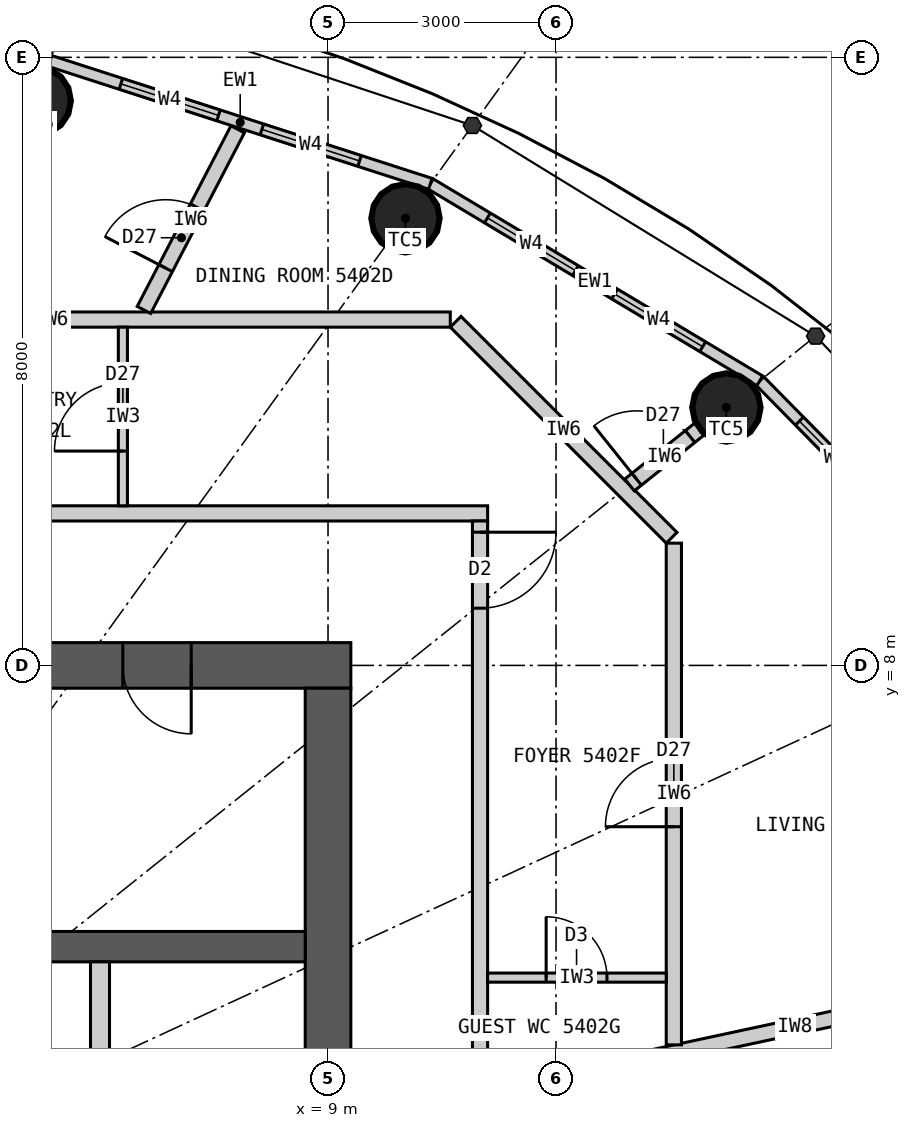
"""IFC4 building model, lengths in metres.
Left out: names, types, materials, properties, quantities, classifications, styles, units other than length and angle.
Written with IfcOpenShell. Run it as: python <this file> out.ifc"""

import sys

from ifc_helpers import new_model, si_unit, direction, frame, frame_2d, origin, origin_2d, place, context, subcontext, project, spatial, rectangle, circle, extrude, element, fill, save


model = new_model("IFC4")
c1 = context("Model", 3, precision=1e-05, world=origin(), true_north=direction((0.0, 1.0)))
c2 = subcontext(c1, "Body", "Model", "MODEL_VIEW")
j1 = project(units=[si_unit("LENGTHUNIT", "METRE"), si_unit("PLANEANGLEUNIT", "RADIAN")], contexts=[c1])
p1 = place(None, origin())
s1 = spatial("IfcSite", under=j1, at=p1, CompositionType="ELEMENT")
p2 = place(p1, origin())
s2 = spatial("IfcBuilding", under=s1, at=p2, CompositionType="ELEMENT")
p3 = place(p2, frame((0.0, 0.0, 202.8)))
s3 = spatial("IfcBuildingStorey", under=s2, at=p3, CompositionType="ELEMENT", Elevation=202.8)
for number, where, z_axis, x_axis in (
    (1, (14.241, 11.393, 0.0), (0.0, 0.0, 1.0), (1.0, 0.0, 0.0)),
    (2, (10.019, 13.883, 0.0), (0.0, 0.0, 1.0), (1.0, 0.0, 0.0)),
    (3, (5.167, 15.427, 0.0), (0.0, 0.0, 1.0), (1.0, 0.0, 0.0)),
):
    element("IfcColumn", number, at=place(p3, frame(where, z_axis=z_axis, x_axis=x_axis)), inside=s3, PredefinedType="COLUMN", context=c2, shape_type="SweptSolid", body=[
        extrude(circle(Radius=0.45, at=origin_2d()), origin(), (0.0, 0.0, 1.0), 3.3),
    ])
p4 = place(p3, frame((-9.3, 8.0, 0.0), z_axis=(0.0, 0.0, 1.0), x_axis=(1.0, 0.0, 0.0)))
e4 = element("IfcWall", 4, at=p4, inside=s3, PredefinedType="SHEAR", context=c2, shape_type="SweptSolid", body=[
    extrude(rectangle(XDim=18.6, YDim=0.6, at=frame_2d((9.3, 0.0))), origin(), (0.0, 0.0, 1.0), 3.3),
])
p5 = place(p4, frame((8.0, 0.0, 0.0)))
e5 = element("IfcOpeningElement", 5, at=p5, cuts=e4, PredefinedType="OPENING", context=c2, shape_type="SweptSolid", body=[
    extrude(rectangle(XDim=1.2, YDim=2.2, at=frame_2d((0.6, 1.1))), frame((0.0, 0.31, 0.0), z_axis=(0.0, -1.0, 0.0), x_axis=(1.0, 0.0, 0.0)), (0.0, 0.0, 1.0), 0.62),
])
p6 = place(p4, frame((15.6, 0.0, 0.0)))
e6 = element("IfcOpeningElement", 6, at=p6, cuts=e4, PredefinedType="OPENING", context=c2, shape_type="SweptSolid", body=[
    extrude(rectangle(XDim=0.9, YDim=2.2, at=frame_2d((0.45, 1.1))), frame((0.0, 0.31, 0.0), z_axis=(0.0, -1.0, 0.0), x_axis=(1.0, 0.0, 0.0)), (0.0, 0.0, 1.0), 0.62),
])
p7 = place(p3, frame((9.0, -7.7, 0.0), z_axis=(0.0, 0.0, 1.0), x_axis=(0.0, 1.0, 0.0)))
e7 = element("IfcWall", 7, at=p7, inside=s3, PredefinedType="SHEAR", context=c2, shape_type="SweptSolid", body=[
    extrude(rectangle(XDim=15.4, YDim=0.6, at=frame_2d((7.7, 0.0))), origin(), (0.0, 0.0, 1.0), 3.3),
])
p8 = place(p7, frame((6.8, 0.0, 0.0)))
e8 = element("IfcOpeningElement", 8, at=p8, cuts=e7, PredefinedType="OPENING", context=c2, shape_type="SweptSolid", body=[
    extrude(rectangle(XDim=1.8, YDim=2.2, at=frame_2d((0.9, 1.1))), frame((0.0, 0.31, 0.0), z_axis=(0.0, -1.0, 0.0), x_axis=(1.0, 0.0, 0.0)), (0.0, 0.0, 1.0), 0.62),
])
p9 = place(p3, frame((-8.7, 4.3, 0.0), z_axis=(0.0, 0.0, 1.0), x_axis=(1.0, 0.0, 0.0)))
e9 = element("IfcWall", 9, at=p9, inside=s3, PredefinedType="SHEAR", context=c2, shape_type="SweptSolid", body=[
    extrude(rectangle(XDim=17.4, YDim=0.4, at=frame_2d((8.7, 0.0))), origin(), (0.0, 0.0, 1.0), 3.3),
])
p10 = place(p3, frame((6.0, 1.75, 0.0), z_axis=(0.0, 0.0, 1.0), x_axis=(0.0, 1.0, 0.0)))
e10 = element("IfcWall", 10, at=p10, inside=s3, PredefinedType="PARTITIONING", context=c2, shape_type="SweptSolid", body=[
    extrude(rectangle(XDim=2.35, YDim=0.25, at=frame_2d((1.175, 0.0))), origin(), (0.0, 0.0, 1.0), 3.3),
])
p11 = place(p3, frame((18.04, 8.332, 0.0), z_axis=(0.0, 0.0, 1.0), x_axis=(-0.701527379618, 0.712642501993, 0.0)))
e11 = element("IfcWall", 11, at=p11, inside=s3, PredefinedType="ELEMENTEDWALL", context=c2, shape_type="SweptSolid", body=[
    extrude(rectangle(XDim=4.788, YDim=0.15, at=frame_2d((2.394, 0.0))), origin(), (0.0, 0.0, 1.0), 3.12),
])
p12 = place(p11, frame((0.744, 0.0, 0.9)))
e12 = element("IfcOpeningElement", 12, at=p12, cuts=e11, PredefinedType="OPENING", context=c2, shape_type="SweptSolid", body=[
    extrude(rectangle(XDim=1.35, YDim=1.9, at=frame_2d((0.675, 0.95))), frame((0.0, 0.085, 0.0), z_axis=(0.0, -1.0, 0.0), x_axis=(1.0, 0.0, 0.0)), (0.0, 0.0, 1.0), 0.17),
])
p13 = place(p11, frame((2.694, 0.0, 0.9)))
e13 = element("IfcOpeningElement", 13, at=p13, cuts=e11, PredefinedType="OPENING", context=c2, shape_type="SweptSolid", body=[
    extrude(rectangle(XDim=1.35, YDim=1.9, at=frame_2d((0.675, 0.95))), frame((0.0, 0.085, 0.0), z_axis=(0.0, -1.0, 0.0), x_axis=(1.0, 0.0, 0.0)), (0.0, 0.0, 1.0), 0.17),
])
p14 = place(p3, frame((14.68, 11.744, 0.0), z_axis=(0.0, 0.0, 1.0), x_axis=(-0.85822150553, 0.513279502265, 0.0)))
e14 = element("IfcWall", 14, at=p14, inside=s3, PredefinedType="ELEMENTEDWALL", context=c2, shape_type="SweptSolid", body=[
    extrude(rectangle(XDim=5.05, YDim=0.15, at=frame_2d((2.525, 0.0))), origin(), (0.0, 0.0, 1.0), 3.12),
])
p15 = place(p14, frame((0.875, 0.0, 0.9)))
e15 = element("IfcOpeningElement", 15, at=p15, cuts=e14, PredefinedType="OPENING", context=c2, shape_type="SweptSolid", body=[
    extrude(rectangle(XDim=1.35, YDim=1.9, at=frame_2d((0.675, 0.95))), frame((0.0, 0.085, 0.0), z_axis=(0.0, -1.0, 0.0), x_axis=(1.0, 0.0, 0.0)), (0.0, 0.0, 1.0), 0.17),
])
p16 = place(p14, frame((2.825, 0.0, 0.9)))
e16 = element("IfcOpeningElement", 16, at=p16, cuts=e14, PredefinedType="OPENING", context=c2, shape_type="SweptSolid", body=[
    extrude(rectangle(XDim=1.35, YDim=1.9, at=frame_2d((0.675, 0.95))), frame((0.0, 0.085, 0.0), z_axis=(0.0, -1.0, 0.0), x_axis=(1.0, 0.0, 0.0)), (0.0, 0.0, 1.0), 0.17),
])
p17 = place(p3, frame((10.346, 14.336, 0.0), z_axis=(0.0, 0.0, 1.0), x_axis=(-0.951644702515, 0.307200846638, 0.0)))
e17 = element("IfcWall", 17, at=p17, inside=s3, PredefinedType="ELEMENTEDWALL", context=c2, shape_type="SweptSolid", body=[
    extrude(rectangle(XDim=5.258, YDim=0.15, at=frame_2d((2.629, 0.0))), origin(), (0.0, 0.0, 1.0), 3.12),
])
p18 = place(p17, frame((0.979, 0.0, 0.9)))
e18 = element("IfcOpeningElement", 18, at=p18, cuts=e17, PredefinedType="OPENING", context=c2, shape_type="SweptSolid", body=[
    extrude(rectangle(XDim=1.35, YDim=1.9, at=frame_2d((0.675, 0.95))), frame((0.0, 0.085, 0.0), z_axis=(0.0, -1.0, 0.0), x_axis=(1.0, 0.0, 0.0)), (0.0, 0.0, 1.0), 0.17),
])
p19 = place(p17, frame((2.929, 0.0, 0.9)))
e19 = element("IfcOpeningElement", 19, at=p19, cuts=e17, PredefinedType="OPENING", context=c2, shape_type="SweptSolid", body=[
    extrude(rectangle(XDim=1.35, YDim=1.9, at=frame_2d((0.675, 0.95))), frame((0.0, 0.085, 0.0), z_axis=(0.0, -1.0, 0.0), x_axis=(1.0, 0.0, 0.0)), (0.0, 0.0, 1.0), 0.17),
])
p20 = place(p3, frame((-11.1, 10.0, 0.0), z_axis=(0.0, 0.0, 1.0), x_axis=(1.0, 0.0, 0.0)))
e20 = element("IfcWall", 20, at=p20, inside=s3, PredefinedType="PARTITIONING", context=c2, shape_type="SweptSolid", body=[
    extrude(rectangle(XDim=22.2, YDim=0.2, at=frame_2d((11.1, 0.0))), origin(), (0.0, 0.0, 1.0), 3.12),
])
p21 = place(p20, frame((2.309, 0.0, 0.0)))
e21 = element("IfcOpeningElement", 21, at=p21, cuts=e20, PredefinedType="OPENING", context=c2, shape_type="SweptSolid", body=[
    extrude(rectangle(XDim=1.0, YDim=2.2, at=frame_2d((0.5, 1.1))), frame((0.0, 0.11, 0.0), z_axis=(0.0, -1.0, 0.0), x_axis=(1.0, 0.0, 0.0)), (0.0, 0.0, 1.0), 0.22),
])
p22 = place(p3, frame((11.0, -9.9, 0.0), z_axis=(0.0, 0.0, 1.0), x_axis=(0.0, 1.0, 0.0)))
e22 = element("IfcWall", 22, at=p22, inside=s3, PredefinedType="PARTITIONING", context=c2, shape_type="SweptSolid", body=[
    extrude(rectangle(XDim=19.8, YDim=0.2, at=frame_2d((9.9, 0.0))), origin(), (0.0, 0.0, 1.0), 3.12),
])
p23 = place(p22, frame((10.32, 0.0, 0.0)))
e23 = element("IfcOpeningElement", 23, at=p23, cuts=e22, PredefinedType="OPENING", context=c2, shape_type="SweptSolid", body=[
    extrude(rectangle(XDim=1.0, YDim=2.2, at=frame_2d((0.5, 1.1))), frame((0.0, 0.11, 0.0), z_axis=(0.0, -1.0, 0.0), x_axis=(1.0, 0.0, 0.0)), (0.0, 0.0, 1.0), 0.22),
])
p24 = place(p22, frame((18.653, 0.0, 0.0)))
e24 = element("IfcOpeningElement", 24, at=p24, cuts=e22, PredefinedType="OPENING", context=c2, shape_type="SweptSolid", body=[
    extrude(rectangle(XDim=1.0, YDim=2.2, at=frame_2d((0.5, 1.1))), frame((0.0, 0.11, 0.0), z_axis=(0.0, -1.0, 0.0), x_axis=(1.0, 0.0, 0.0)), (0.0, 0.0, 1.0), 0.22),
])
p25 = place(p22, frame((0.379, 0.0, 0.0)))
e25 = element("IfcOpeningElement", 25, at=p25, cuts=e22, PredefinedType="OPENING", context=c2, shape_type="SweptSolid", body=[
    extrude(rectangle(XDim=1.0, YDim=2.2, at=frame_2d((0.5, 1.1))), frame((0.0, 0.11, 0.0), z_axis=(0.0, -1.0, 0.0), x_axis=(1.0, 0.0, 0.0)), (0.0, 0.0, 1.0), 0.22),
])
p26 = place(p3, frame((11.1, 2.379, 0.0), z_axis=(0.0, 0.0, 1.0), x_axis=(0.977789888126, 0.209587534647, 0.0)))
e26 = element("IfcWall", 26, at=p26, inside=s3, PredefinedType="PARTITIONING", context=c2, shape_type="SweptSolid", body=[
    extrude(rectangle(XDim=8.273, YDim=0.2, at=frame_2d((4.136, 0.0))), origin(), (0.0, 0.0, 1.0), 2.42),
])
p27 = place(p3, frame((13.55, 3.008, 0.0), z_axis=(0.0, 0.0, 1.0), x_axis=(0.0, 1.0, 0.0)))
e27 = element("IfcWall", 27, at=p27, inside=s3, PredefinedType="PARTITIONING", context=c2, shape_type="SweptSolid", body=[
    extrude(rectangle(XDim=6.601, YDim=0.2, at=frame_2d((3.3, 0.0))), origin(), (0.0, 0.0, 1.0), 3.12),
])
p28 = place(p27, frame((2.87, 0.0, 0.0)))
e28 = element("IfcOpeningElement", 28, at=p28, cuts=e27, PredefinedType="OPENING", context=c2, shape_type="SweptSolid", body=[
    extrude(rectangle(XDim=0.9, YDim=2.1, at=frame_2d((0.45, 1.05))), frame((0.0, 0.11, 0.0), z_axis=(0.0, -1.0, 0.0), x_axis=(1.0, 0.0, 0.0)), (0.0, 0.0, 1.0), 0.22),
])
p29 = place(p3, frame((13.521, 9.679, 0.0), z_axis=(0.0, 0.0, 1.0), x_axis=(-0.707106781187, 0.707106781187, 0.0)))
e29 = element("IfcWall", 29, at=p29, inside=s3, PredefinedType="PARTITIONING", context=c2, shape_type="SweptSolid", body=[
    extrude(rectangle(XDim=4.019, YDim=0.2, at=frame_2d((2.009, 0.0))), origin(), (0.0, 0.0, 1.0), 3.12),
])
p30 = place(p3, frame((10.609, 12.55, 0.0), z_axis=(0.0, 0.0, 1.0), x_axis=(-1.0, 0.0, 0.0)))
e30 = element("IfcWall", 30, at=p30, inside=s3, PredefinedType="PARTITIONING", context=c2, shape_type="SweptSolid", body=[
    extrude(rectangle(XDim=10.508, YDim=0.2, at=frame_2d((5.254, 0.0))), origin(), (0.0, 0.0, 1.0), 3.12),
])
p31 = place(p30, frame((6.588, 0.0, 0.0)))
e31 = element("IfcOpeningElement", 31, at=p31, cuts=e30, PredefinedType="OPENING", context=c2, shape_type="SweptSolid", body=[
    extrude(rectangle(XDim=0.9, YDim=2.1, at=frame_2d((0.45, 1.05))), frame((0.0, 0.11, 0.0), z_axis=(0.0, -1.0, 0.0), x_axis=(1.0, 0.0, 0.0)), (0.0, 0.0, 1.0), 0.22),
])
p32 = place(p30, frame((8.308, 0.0, 0.0)))
e32 = element("IfcOpeningElement", 32, at=p32, cuts=e30, PredefinedType="OPENING", context=c2, shape_type="SweptSolid", body=[
    extrude(rectangle(XDim=0.8, YDim=2.1, at=frame_2d((0.4, 1.05))), frame((0.0, 0.11, 0.0), z_axis=(0.0, -1.0, 0.0), x_axis=(1.0, 0.0, 0.0)), (0.0, 0.0, 1.0), 0.22),
])
p33 = place(p3, frame((12.968, 10.374, 0.0), z_axis=(0.0, 0.0, 1.0), x_axis=(0.780888968944, 0.624669847345, 0.0)))
e33 = element("IfcWall", 33, at=p33, inside=s3, PredefinedType="PARTITIONING", context=c2, shape_type="SweptSolid", body=[
    extrude(rectangle(XDim=1.181, YDim=0.2, at=frame_2d((0.591, 0.0))), origin(), (0.0, 0.0, 1.0), 2.42),
])
p34 = place(p33, frame((0.12, 0.0, 0.0)))
e34 = element("IfcOpeningElement", 34, at=p34, cuts=e33, PredefinedType="OPENING", context=c2, shape_type="SweptSolid", body=[
    extrude(rectangle(XDim=0.9, YDim=2.1, at=frame_2d((0.45, 1.05))), frame((0.0, 0.11, 0.0), z_axis=(0.0, -1.0, 0.0), x_axis=(1.0, 0.0, 0.0)), (0.0, 0.0, 1.0), 0.22),
])
p35 = place(p3, frame((6.578, 12.677, 0.0), z_axis=(0.0, 0.0, 1.0), x_axis=(0.460620531465, 0.887597164255, 0.0)))
e35 = element("IfcWall", 35, at=p35, inside=s3, PredefinedType="PARTITIONING", context=c2, shape_type="SweptSolid", body=[
    extrude(rectangle(XDim=2.678, YDim=0.2, at=frame_2d((1.339, 0.0))), origin(), (0.0, 0.0, 1.0), 3.12),
])
p36 = place(p35, frame((0.62, 0.0, 0.0)))
e36 = element("IfcOpeningElement", 36, at=p36, cuts=e35, PredefinedType="OPENING", context=c2, shape_type="SweptSolid", body=[
    extrude(rectangle(XDim=0.9, YDim=2.1, at=frame_2d((0.45, 1.05))), frame((0.0, 0.11, 0.0), z_axis=(0.0, -1.0, 0.0), x_axis=(1.0, 0.0, 0.0)), (0.0, 0.0, 1.0), 0.22),
])
p37 = place(p3, frame((11.1, 3.893, 0.0), z_axis=(0.0, 0.0, 1.0), x_axis=(1.0, 0.0, 0.0)))
e37 = element("IfcWall", 37, at=p37, inside=s3, PredefinedType="PARTITIONING", context=c2, shape_type="SweptSolid", body=[
    extrude(rectangle(XDim=2.35, YDim=0.12, at=frame_2d((1.175, 0.0))), origin(), (0.0, 0.0, 1.0), 3.12),
])
p38 = place(p37, frame((0.77, 0.0, 0.0)))
e38 = element("IfcOpeningElement", 38, at=p38, cuts=e37, PredefinedType="OPENING", context=c2, shape_type="SweptSolid", body=[
    extrude(rectangle(XDim=0.8, YDim=2.1, at=frame_2d((0.4, 1.05))), frame((0.0, 0.07, 0.0), z_axis=(0.0, -1.0, 0.0), x_axis=(1.0, 0.0, 0.0)), (0.0, 0.0, 1.0), 0.14),
])
p39 = place(p3, frame((6.301, 10.1, 0.0), z_axis=(0.0, 0.0, 1.0), x_axis=(0.0, 1.0, 0.0)))
e39 = element("IfcWall", 39, at=p39, inside=s3, PredefinedType="PARTITIONING", context=c2, shape_type="SweptSolid", body=[
    extrude(rectangle(XDim=2.35, YDim=0.12, at=frame_2d((1.175, 0.0))), origin(), (0.0, 0.0, 1.0), 3.12),
])
p40 = place(p39, frame((0.72, 0.0, 0.0)))
e40 = element("IfcOpeningElement", 40, at=p40, cuts=e39, PredefinedType="OPENING", context=c2, shape_type="SweptSolid", body=[
    extrude(rectangle(XDim=0.9, YDim=2.1, at=frame_2d((0.45, 1.05))), frame((0.0, 0.07, 0.0), z_axis=(0.0, -1.0, 0.0), x_axis=(1.0, 0.0, 0.0)), (0.0, 0.0, 1.0), 0.14),
])
p41 = place(p13, origin())
e41 = element("IfcWindow", 41, at=p41, inside=s3, PartitioningType="SINGLE_PANEL", PredefinedType="WINDOW", context=c2, shape_type="SweptSolid", body=[
    extrude(rectangle(XDim=1.35, YDim=1.9, at=frame_2d((0.675, 0.95))), frame((0.0, 0.03, 0.0), z_axis=(0.0, -1.0, 0.0), x_axis=(1.0, 0.0, 0.0)), (0.0, 0.0, 1.0), 0.06),
])
fill(e13, e41)
p42 = place(p15, origin())
e42 = element("IfcWindow", 42, at=p42, inside=s3, PartitioningType="SINGLE_PANEL", PredefinedType="WINDOW", context=c2, shape_type="SweptSolid", body=[
    extrude(rectangle(XDim=1.35, YDim=1.9, at=frame_2d((0.675, 0.95))), frame((0.0, 0.03, 0.0), z_axis=(0.0, -1.0, 0.0), x_axis=(1.0, 0.0, 0.0)), (0.0, 0.0, 1.0), 0.06),
])
fill(e15, e42)
p43 = place(p16, origin())
e43 = element("IfcWindow", 43, at=p43, inside=s3, PartitioningType="SINGLE_PANEL", PredefinedType="WINDOW", context=c2, shape_type="SweptSolid", body=[
    extrude(rectangle(XDim=1.35, YDim=1.9, at=frame_2d((0.675, 0.95))), frame((0.0, 0.03, 0.0), z_axis=(0.0, -1.0, 0.0), x_axis=(1.0, 0.0, 0.0)), (0.0, 0.0, 1.0), 0.06),
])
fill(e16, e43)
p44 = place(p18, origin())
e44 = element("IfcWindow", 44, at=p44, inside=s3, PartitioningType="SINGLE_PANEL", PredefinedType="WINDOW", context=c2, shape_type="SweptSolid", body=[
    extrude(rectangle(XDim=1.35, YDim=1.9, at=frame_2d((0.675, 0.95))), frame((0.0, 0.03, 0.0), z_axis=(0.0, -1.0, 0.0), x_axis=(1.0, 0.0, 0.0)), (0.0, 0.0, 1.0), 0.06),
])
fill(e18, e44)
p45 = place(p19, origin())
e45 = element("IfcWindow", 45, at=p45, inside=s3, PartitioningType="SINGLE_PANEL", PredefinedType="WINDOW", context=c2, shape_type="SweptSolid", body=[
    extrude(rectangle(XDim=1.35, YDim=1.9, at=frame_2d((0.675, 0.95))), frame((0.0, 0.03, 0.0), z_axis=(0.0, -1.0, 0.0), x_axis=(1.0, 0.0, 0.0)), (0.0, 0.0, 1.0), 0.06),
])
fill(e19, e45)
p46 = place(p24, origin())
e46 = element("IfcDoor", 46, at=p46, inside=s3, OperationType="SINGLE_SWING_RIGHT", PredefinedType="DOOR", context=c2, shape_type="SweptSolid", body=[
    extrude(rectangle(XDim=1.0, YDim=2.2, at=frame_2d((0.5, 1.1))), frame((0.0, 0.025, 0.0), z_axis=(0.0, -1.0, 0.0), x_axis=(1.0, 0.0, 0.0)), (0.0, 0.0, 1.0), 0.05),
])
fill(e24, e46)
p47 = place(p38, origin())
e47 = element("IfcDoor", 47, at=p47, inside=s3, OperationType="SINGLE_SWING_LEFT", PredefinedType="DOOR", context=c2, shape_type="SweptSolid", body=[
    extrude(rectangle(XDim=0.8, YDim=2.1, at=frame_2d((0.4, 1.05))), frame((0.0, 0.025, 0.0), z_axis=(0.0, -1.0, 0.0), x_axis=(1.0, 0.0, 0.0)), (0.0, 0.0, 1.0), 0.05),
])
fill(e38, e47)
p48 = place(p40, origin())
e48 = element("IfcDoor", 48, at=p48, inside=s3, OperationType="SINGLE_SWING_LEFT", PredefinedType="DOOR", context=c2, shape_type="SweptSolid", body=[
    extrude(rectangle(XDim=0.9, YDim=2.1, at=frame_2d((0.45, 1.05))), frame((0.0, 0.025, 0.0), z_axis=(0.0, -1.0, 0.0), x_axis=(1.0, 0.0, 0.0)), (0.0, 0.0, 1.0), 0.05),
])
fill(e40, e48)
p49 = place(p28, origin())
e49 = element("IfcDoor", 49, at=p49, inside=s3, OperationType="SINGLE_SWING_LEFT", PredefinedType="DOOR", context=c2, shape_type="SweptSolid", body=[
    extrude(rectangle(XDim=0.9, YDim=2.1, at=frame_2d((0.45, 1.05))), frame((0.0, 0.025, 0.0), z_axis=(0.0, -1.0, 0.0), x_axis=(1.0, 0.0, 0.0)), (0.0, 0.0, 1.0), 0.05),
])
fill(e28, e49)
p50 = place(p34, origin())
e50 = element("IfcDoor", 50, at=p50, inside=s3, OperationType="SINGLE_SWING_LEFT", PredefinedType="DOOR", context=c2, shape_type="SweptSolid", body=[
    extrude(rectangle(XDim=0.9, YDim=2.1, at=frame_2d((0.45, 1.05))), frame((0.0, 0.025, 0.0), z_axis=(0.0, -1.0, 0.0), x_axis=(1.0, 0.0, 0.0)), (0.0, 0.0, 1.0), 0.05),
])
fill(e34, e50)
p51 = place(p36, origin())
e51 = element("IfcDoor", 51, at=p51, inside=s3, OperationType="SINGLE_SWING_LEFT", PredefinedType="DOOR", context=c2, shape_type="SweptSolid", body=[
    extrude(rectangle(XDim=0.9, YDim=2.1, at=frame_2d((0.45, 1.05))), frame((0.0, 0.025, 0.0), z_axis=(0.0, -1.0, 0.0), x_axis=(1.0, 0.0, 0.0)), (0.0, 0.0, 1.0), 0.05),
])
fill(e36, e51)
p52 = place(p6, origin())
e52 = element("IfcDoor", 52, at=p52, inside=s3, OperationType="SINGLE_SWING_RIGHT", PredefinedType="DOOR", context=c2, shape_type="SweptSolid", body=[
    extrude(rectangle(XDim=0.9, YDim=2.2, at=frame_2d((0.45, 1.1))), frame((0.0, 0.025, 0.0), z_axis=(0.0, -1.0, 0.0), x_axis=(1.0, 0.0, 0.0)), (0.0, 0.0, 1.0), 0.05),
])
fill(e6, e52)
save(model, sys.argv[1])
